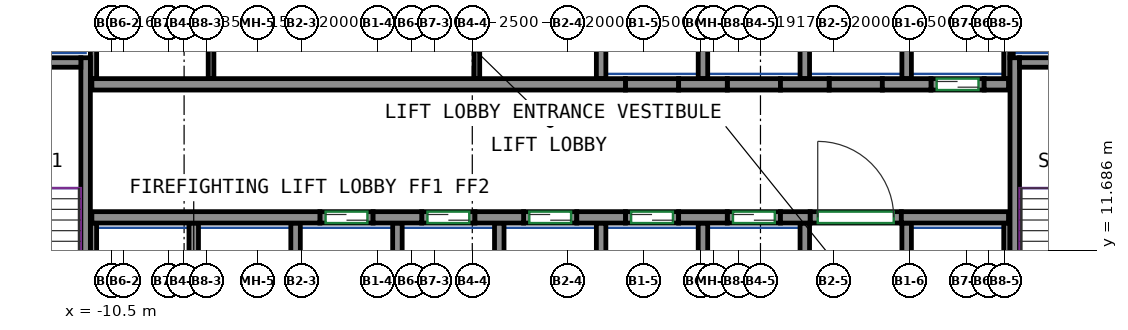
"""IFC4 building model, lengths in metres.
Left out: names, types, materials, properties, quantities, classifications, styles, units other than length and angle.
Written with IfcOpenShell. Run it as: python <this file> out.ifc"""

import sys

from ifc_helpers import new_model, si_unit, direction, frame, frame_2d, origin, place, context, subcontext, project, spatial, rectangle, extrude, source, transform, mapped, element, fill, save


model = new_model("IFC4")
c1 = context("Model", 3, precision=1e-05, world=origin(), true_north=direction((0.0, 1.0)))
c2 = subcontext(c1, "Body", "Model", "MODEL_VIEW")
j1 = project(units=[si_unit("LENGTHUNIT", "METRE"), si_unit("PLANEANGLEUNIT", "RADIAN")], contexts=[c1])
p1 = place(None, origin())
s1 = spatial("IfcSite", under=j1, at=p1, CompositionType="ELEMENT")
p2 = place(p1, origin())
s2 = spatial("IfcBuilding", under=s1, at=p2, CompositionType="ELEMENT")
p3 = place(p2, frame((0.0, 0.0, 175.3)))
s3 = spatial("IfcBuildingStorey", under=s2, at=p3, CompositionType="ELEMENT", Elevation=175.3)
m1 = source(origin(), c2, "Body", "SweptSolid", [
    extrude(rectangle(XDim=7.75, YDim=0.25, at=frame_2d((3.875, 0.0))), origin(), (0.0, 0.0, 1.0), 3.12),
])
p4 = place(p3, frame((-11.175, 9.0, 0.0), z_axis=(0.0, 0.0, 1.0), x_axis=(0.0, 1.0, 0.0)))
e1 = element("IfcWall", 1, at=p4, inside=s3, PredefinedType="SHEAR", context=c2, shape_type="MappedRepresentation", body=[
    mapped(m1, transform((0.0, 0.0, 0.0))),
])
m2 = source(origin(), c2, "Body", "SweptSolid", [
    extrude(rectangle(XDim=3.7, YDim=0.25, at=frame_2d((1.85, 0.0))), origin(), (0.0, 0.0, 1.0), 3.12),
])
p5 = place(p3, frame((-15.0, 16.625, 0.0), z_axis=(0.0, 0.0, 1.0), x_axis=(1.0, 0.0, 0.0)))
e2 = element("IfcWall", 2, at=p5, inside=s3, PredefinedType="SHEAR", context=c2, shape_type="MappedRepresentation", body=[
    mapped(m2, transform((0.0, 0.0, 0.0))),
])
p6 = place(p3, frame((13.275, 9.0, 0.0), z_axis=(0.0, 0.0, 1.0), x_axis=(0.0, 1.0, 0.0)))
e3 = element("IfcWall", 3, at=p6, inside=s3, PredefinedType="SHEAR", context=c2, shape_type="MappedRepresentation", body=[
    mapped(m1, transform((0.0, 0.0, 0.0))),
])
m3 = source(origin(), c2, "Body", "SweptSolid", [
    extrude(rectangle(XDim=3.7, YDim=0.25, at=frame_2d((1.85, 0.0))), origin(), (0.0, 0.0, 1.0), 3.12),
])
p7 = place(p3, frame((13.4, 16.625, 0.0), z_axis=(0.0, 0.0, 1.0), x_axis=(1.0, 0.0, 0.0)))
e4 = element("IfcWall", 4, at=p7, inside=s3, PredefinedType="SHEAR", context=c2, shape_type="MappedRepresentation", body=[
    mapped(m3, transform((0.0, 0.0, 0.0))),
])
m4 = source(origin(), c2, "Body", "SweptSolid", [
    extrude(rectangle(XDim=6.0, YDim=0.3, at=frame_2d((3.0, 0.0))), origin(), (0.0, 0.0, 1.0), 3.12),
])
p8 = place(p3, frame((-11.01, 12.55, 0.0), z_axis=(0.0, 0.0, 1.0), x_axis=(1.0, 0.0, 0.0)))
e5 = element("IfcWall", 5, at=p8, inside=s3, PredefinedType="SHEAR", context=c2, shape_type="MappedRepresentation", body=[
    mapped(m4, transform((0.0, 0.0, 0.0))),
])
m5 = source(origin(), c2, "Body", "SweptSolid", [
    extrude(rectangle(XDim=1.28, YDim=0.3, at=frame_2d((0.64, 0.0))), origin(), (0.0, 0.0, 1.0), 3.12),
])
for number, where, z_axis, x_axis in (
    (6, (-3.61, 12.55, 0.0), (0.0, 0.0, 1.0), (1.0, 0.0, 0.0)),
    (7, (-0.93, 12.55, 0.0), (0.0, 0.0, 1.0), (1.0, 0.0, 0.0)),
    (8, (1.75, 12.55, 0.0), (0.0, 0.0, 1.0), (1.0, 0.0, 0.0)),
    (9, (4.43, 12.55, 0.0), (0.0, 0.0, 1.0), (1.0, 0.0, 0.0)),
):
    element("IfcWall", number, at=place(p3, frame(where, z_axis=z_axis, x_axis=x_axis)), inside=s3, PredefinedType="SHEAR", context=c2, shape_type="MappedRepresentation", body=[
        mapped(m5, transform((0.0, 0.0, 0.0))),
    ])
m6 = source(origin(), c2, "Body", "SweptSolid", [
    extrude(rectangle(XDim=0.78, YDim=0.3, at=frame_2d((0.39, 0.0))), origin(), (0.0, 0.0, 1.0), 3.12),
])
p9 = place(p3, frame((7.11, 12.55, 0.0), z_axis=(0.0, 0.0, 1.0), x_axis=(1.0, 0.0, 0.0)))
e10 = element("IfcWall", 10, at=p9, inside=s3, PredefinedType="SHEAR", context=c2, shape_type="MappedRepresentation", body=[
    mapped(m6, transform((0.0, 0.0, 0.0))),
])
m7 = source(origin(), c2, "Body", "SweptSolid", [
    extrude(rectangle(XDim=2.82, YDim=0.3, at=frame_2d((1.41, 0.0))), origin(), (0.0, 0.0, 1.0), 3.12),
])
p10 = place(p3, frame((10.29, 12.55, 0.0), z_axis=(0.0, 0.0, 1.0), x_axis=(1.0, 0.0, 0.0)))
e11 = element("IfcWall", 11, at=p10, inside=s3, PredefinedType="SHEAR", context=c2, shape_type="MappedRepresentation", body=[
    mapped(m7, transform((0.0, 0.0, 0.0))),
])
m8 = source(origin(), c2, "Body", "SweptSolid", [
    extrude(rectangle(XDim=14.04, YDim=0.3, at=frame_2d((7.02, 0.0))), origin(), (0.0, 0.0, 1.0), 3.12),
])
p11 = place(p3, frame((-11.01, 16.05, 0.0), z_axis=(0.0, 0.0, 1.0), x_axis=(1.0, 0.0, 0.0)))
e12 = element("IfcWall", 12, at=p11, inside=s3, PredefinedType="SHEAR", context=c2, shape_type="MappedRepresentation", body=[
    mapped(m8, transform((0.0, 0.0, 0.0))),
])
p12 = place(p3, frame((4.43, 16.05, 0.0), z_axis=(0.0, 0.0, 1.0), x_axis=(1.0, 0.0, 0.0)))
e13 = element("IfcWall", 13, at=p12, inside=s3, PredefinedType="SHEAR", context=c2, shape_type="MappedRepresentation", body=[
    mapped(m5, transform((0.0, 0.0, 0.0))),
])
m9 = source(origin(), c2, "Body", "SweptSolid", [
    extrude(rectangle(XDim=1.28, YDim=0.3, at=frame_2d((0.64, 0.0))), origin(), (0.0, 0.0, 1.0), 3.12),
])
p13 = place(p3, frame((7.11, 16.05, 0.0), z_axis=(0.0, 0.0, 1.0), x_axis=(1.0, 0.0, 0.0)))
e14 = element("IfcWall", 14, at=p13, inside=s3, PredefinedType="SHEAR", context=c2, shape_type="MappedRepresentation", body=[
    mapped(m9, transform((0.0, 0.0, 0.0))),
])
p14 = place(p3, frame((9.79, 16.05, 0.0), z_axis=(0.0, 0.0, 1.0), x_axis=(1.0, 0.0, 0.0)))
e15 = element("IfcWall", 15, at=p14, inside=s3, PredefinedType="SHEAR", context=c2, shape_type="MappedRepresentation", body=[
    mapped(m5, transform((0.0, 0.0, 0.0))),
])
m10 = source(origin(), c2, "Body", "SweptSolid", [
    extrude(rectangle(XDim=0.64, YDim=0.3, at=frame_2d((0.32, 0.0))), origin(), (0.0, 0.0, 1.0), 3.12),
])
p15 = place(p3, frame((12.47, 16.05, 0.0), z_axis=(0.0, 0.0, 1.0), x_axis=(1.0, 0.0, 0.0)))
e16 = element("IfcWall", 16, at=p15, inside=s3, PredefinedType="SHEAR", context=c2, shape_type="MappedRepresentation", body=[
    mapped(m10, transform((0.0, 0.0, 0.0))),
])
m11 = source(origin(), c2, "Body", "SweptSolid", [
    extrude(rectangle(XDim=1.4, YDim=0.3, at=frame_2d((0.7, 0.0))), origin(), (0.0, 0.0, 1.0), 3.12),
])
p16 = place(p3, frame((-5.01, 12.55, 0.0), z_axis=(0.0, 0.0, 1.0), x_axis=(1.0, 0.0, 0.0)))
e17 = element("IfcWall", 17, at=p16, inside=s3, PredefinedType="PARTITIONING", context=c2, shape_type="MappedRepresentation", body=[
    mapped(m11, transform((0.0, 0.0, 0.0))),
])
p17 = place(p16, frame((0.15, 0.0, 0.0)))
e18 = element("IfcOpeningElement", 18, at=p17, cuts=e17, PredefinedType="OPENING", context=c2, shape_type="SweptSolid", body=[
    extrude(rectangle(XDim=1.1, YDim=2.1, at=frame_2d((0.55, 1.05))), frame((0.0, 0.16, 0.0), z_axis=(0.0, -1.0, 0.0), x_axis=(1.0, 0.0, 0.0)), (0.0, 0.0, 1.0), 0.32),
])
m12 = source(origin(), c2, "Body", "SweptSolid", [
    extrude(rectangle(XDim=1.4, YDim=0.3, at=frame_2d((0.7, 0.0))), origin(), (0.0, 0.0, 1.0), 3.12),
])
p18 = place(p3, frame((-2.33, 12.55, 0.0), z_axis=(0.0, 0.0, 1.0), x_axis=(1.0, 0.0, 0.0)))
e19 = element("IfcWall", 19, at=p18, inside=s3, PredefinedType="PARTITIONING", context=c2, shape_type="MappedRepresentation", body=[
    mapped(m12, transform((0.0, 0.0, 0.0))),
])
p19 = place(p18, frame((0.15, 0.0, 0.0)))
e20 = element("IfcOpeningElement", 20, at=p19, cuts=e19, PredefinedType="OPENING", context=c2, shape_type="SweptSolid", body=[
    extrude(rectangle(XDim=1.1, YDim=2.1, at=frame_2d((0.55, 1.05))), frame((0.0, 0.16, 0.0), z_axis=(0.0, -1.0, 0.0), x_axis=(1.0, 0.0, 0.0)), (0.0, 0.0, 1.0), 0.32),
])
p20 = place(p3, frame((0.35, 12.55, 0.0), z_axis=(0.0, 0.0, 1.0), x_axis=(1.0, 0.0, 0.0)))
e21 = element("IfcWall", 21, at=p20, inside=s3, PredefinedType="PARTITIONING", context=c2, shape_type="MappedRepresentation", body=[
    mapped(m11, transform((0.0, 0.0, 0.0))),
])
p21 = place(p20, frame((0.15, 0.0, 0.0)))
e22 = element("IfcOpeningElement", 22, at=p21, cuts=e21, PredefinedType="OPENING", context=c2, shape_type="SweptSolid", body=[
    extrude(rectangle(XDim=1.1, YDim=2.1, at=frame_2d((0.55, 1.05))), frame((0.0, 0.16, 0.0), z_axis=(0.0, -1.0, 0.0), x_axis=(1.0, 0.0, 0.0)), (0.0, 0.0, 1.0), 0.32),
])
p22 = place(p3, frame((3.03, 12.55, 0.0), z_axis=(0.0, 0.0, 1.0), x_axis=(1.0, 0.0, 0.0)))
e23 = element("IfcWall", 23, at=p22, inside=s3, PredefinedType="PARTITIONING", context=c2, shape_type="MappedRepresentation", body=[
    mapped(m11, transform((0.0, 0.0, 0.0))),
])
p23 = place(p22, frame((0.15, 0.0, 0.0)))
e24 = element("IfcOpeningElement", 24, at=p23, cuts=e23, PredefinedType="OPENING", context=c2, shape_type="SweptSolid", body=[
    extrude(rectangle(XDim=1.1, YDim=2.1, at=frame_2d((0.55, 1.05))), frame((0.0, 0.16, 0.0), z_axis=(0.0, -1.0, 0.0), x_axis=(1.0, 0.0, 0.0)), (0.0, 0.0, 1.0), 0.32),
])
p24 = place(p3, frame((5.71, 12.55, 0.0), z_axis=(0.0, 0.0, 1.0), x_axis=(1.0, 0.0, 0.0)))
e25 = element("IfcWall", 25, at=p24, inside=s3, PredefinedType="PARTITIONING", context=c2, shape_type="MappedRepresentation", body=[
    mapped(m12, transform((0.0, 0.0, 0.0))),
])
p25 = place(p24, frame((0.15, 0.0, 0.0)))
e26 = element("IfcOpeningElement", 26, at=p25, cuts=e25, PredefinedType="OPENING", context=c2, shape_type="SweptSolid", body=[
    extrude(rectangle(XDim=1.1, YDim=2.1, at=frame_2d((0.55, 1.05))), frame((0.0, 0.16, 0.0), z_axis=(0.0, -1.0, 0.0), x_axis=(1.0, 0.0, 0.0)), (0.0, 0.0, 1.0), 0.32),
])
p26 = place(p3, frame((11.07, 16.05, 0.0), z_axis=(0.0, 0.0, 1.0), x_axis=(1.0, 0.0, 0.0)))
e27 = element("IfcWall", 27, at=p26, inside=s3, PredefinedType="PARTITIONING", context=c2, shape_type="MappedRepresentation", body=[
    mapped(m11, transform((0.0, 0.0, 0.0))),
])
p27 = place(p26, frame((0.15, 0.0, 0.0)))
e28 = element("IfcOpeningElement", 28, at=p27, cuts=e27, PredefinedType="OPENING", context=c2, shape_type="SweptSolid", body=[
    extrude(rectangle(XDim=1.1, YDim=2.1, at=frame_2d((0.55, 1.05))), frame((0.0, 0.16, 0.0), z_axis=(0.0, -1.0, 0.0), x_axis=(1.0, 0.0, 0.0)), (0.0, 0.0, 1.0), 0.32),
])
m13 = source(origin(), c2, "Body", "SweptSolid", [
    extrude(rectangle(XDim=2.4, YDim=0.3, at=frame_2d((1.2, 0.0))), origin(), (0.0, 0.0, 1.0), 3.12),
])
p28 = place(p3, frame((7.89, 12.55, 0.0), z_axis=(0.0, 0.0, 1.0), x_axis=(1.0, 0.0, 0.0)))
e29 = element("IfcWall", 29, at=p28, inside=s3, PredefinedType="PARTITIONING", context=c2, shape_type="MappedRepresentation", body=[
    mapped(m13, transform((0.0, 0.0, 0.0))),
])
p29 = place(p28, frame((0.2, 0.0, 0.0)))
e30 = element("IfcOpeningElement", 30, at=p29, cuts=e29, PredefinedType="OPENING", context=c2, shape_type="SweptSolid", body=[
    extrude(rectangle(XDim=2.0, YDim=2.1, at=frame_2d((1.0, 1.05))), frame((0.0, 0.16, 0.0), z_axis=(0.0, -1.0, 0.0), x_axis=(1.0, 0.0, 0.0)), (0.0, 0.0, 1.0), 0.32),
])
p30 = place(p3, frame((3.03, 16.05, 0.0), z_axis=(0.0, 0.0, 1.0), x_axis=(1.0, 0.0, 0.0)))
e31 = element("IfcWall", 31, at=p30, inside=s3, PredefinedType="PARTITIONING", context=c2, shape_type="MappedRepresentation", body=[
    mapped(m11, transform((0.0, 0.0, 0.0))),
])
for number, where, z_axis, x_axis in (
    (32, (5.71, 16.05, 0.0), (0.0, 0.0, 1.0), (1.0, 0.0, 0.0)),
    (33, (8.39, 16.05, 0.0), (0.0, 0.0, 1.0), (1.0, 0.0, 0.0)),
):
    element("IfcWall", number, at=place(p3, frame(where, z_axis=z_axis, x_axis=x_axis)), inside=s3, PredefinedType="PARTITIONING", context=c2, shape_type="MappedRepresentation", body=[
        mapped(m12, transform((0.0, 0.0, 0.0))),
    ])
m14 = source(origin(), c2, "Body", "SweptSolid", [
    extrude(rectangle(XDim=3.275, YDim=0.165, at=frame_2d((1.638, 0.0))), origin(), (0.0, 0.0, 1.0), 3.12),
])
p31 = place(p3, frame((13.067, 16.2, 0.0), z_axis=(0.0, 0.0, 1.0), x_axis=(0.0, 1.0, 0.0)))
e34 = element("IfcWall", 34, at=p31, inside=s3, PredefinedType="PARTITIONING", context=c2, shape_type="MappedRepresentation", body=[
    mapped(m14, transform((0.0, 0.0, 0.0))),
])
m15 = source(origin(), c2, "Body", "SweptSolid", [
    extrude(rectangle(XDim=4.8, YDim=0.165, at=frame_2d((2.4, 0.0))), origin(), (0.0, 0.0, 1.0), 3.12),
])
p32 = place(p3, frame((-10.968, 16.2, 0.0), z_axis=(0.0, 0.0, 1.0), x_axis=(0.0, 1.0, 0.0)))
e35 = element("IfcWall", 35, at=p32, inside=s3, PredefinedType="PARTITIONING", context=c2, shape_type="MappedRepresentation", body=[
    mapped(m15, transform((0.0, 0.0, 0.0))),
])
m16 = source(origin(), c2, "Body", "SweptSolid", [
    extrude(rectangle(XDim=3.275, YDim=0.25, at=frame_2d((1.638, 0.0))), origin(), (0.0, 0.0, 1.0), 3.12),
])
p33 = place(p3, frame((10.43, 16.2, 0.0), z_axis=(0.0, 0.0, 1.0), x_axis=(0.0, 1.0, 0.0)))
e36 = element("IfcWall", 36, at=p33, inside=s3, PredefinedType="PARTITIONING", context=c2, shape_type="MappedRepresentation", body=[
    mapped(m16, transform((0.0, 0.0, 0.0))),
])
m17 = source(origin(), c2, "Body", "SweptSolid", [
    extrude(rectangle(XDim=2.725, YDim=0.085, at=frame_2d((1.363, 0.0))), origin(), (0.0, 0.0, 1.0), 3.12),
])
p34 = place(p3, frame((13.192, 16.75, 0.0), z_axis=(0.0, 0.0, 1.0), x_axis=(0.0, 1.0, 0.0)))
e37 = element("IfcWall", 37, at=p34, inside=s3, PredefinedType="PARTITIONING", context=c2, shape_type="MappedRepresentation", body=[
    mapped(m17, transform((0.0, 0.0, 0.0))),
])
for number, where, z_axis, x_axis in (
    (38, (2.39, 16.2, 0.0), (0.0, 0.0, 1.0), (0.0, 1.0, 0.0)),
    (39, (5.07, 16.2, 0.0), (0.0, 0.0, 1.0), (0.0, 1.0, 0.0)),
    (40, (7.75, 16.2, 0.0), (0.0, 0.0, 1.0), (0.0, 1.0, 0.0)),
):
    element("IfcWall", number, at=place(p3, frame(where, z_axis=z_axis, x_axis=x_axis)), inside=s3, PredefinedType="PARTITIONING", context=c2, shape_type="MappedRepresentation", body=[
        mapped(m16, transform((0.0, 0.0, 0.0))),
    ])
m18 = source(origin(), c2, "Body", "SweptSolid", [
    extrude(rectangle(XDim=3.4, YDim=0.25, at=frame_2d((1.7, 0.0))), origin(), (0.0, 0.0, 1.0), 3.12),
])
p35 = place(p3, frame((10.43, 9.0, 0.0), z_axis=(0.0, 0.0, 1.0), x_axis=(0.0, 1.0, 0.0)))
e41 = element("IfcWall", 41, at=p35, inside=s3, PredefinedType="PARTITIONING", context=c2, shape_type="MappedRepresentation", body=[
    mapped(m18, transform((0.0, 0.0, 0.0))),
])
m19 = source(origin(), c2, "Body", "SweptSolid", [
    extrude(rectangle(XDim=3.4, YDim=0.165, at=frame_2d((1.7, 0.0))), origin(), (0.0, 0.0, 1.0), 3.12),
])
p36 = place(p3, frame((13.067, 9.0, 0.0), z_axis=(0.0, 0.0, 1.0), x_axis=(0.0, 1.0, 0.0)))
e42 = element("IfcWall", 42, at=p36, inside=s3, PredefinedType="PARTITIONING", context=c2, shape_type="MappedRepresentation", body=[
    mapped(m19, transform((0.0, 0.0, 0.0))),
])
for number, where, z_axis, x_axis in (
    (43, (2.39, 9.0, 0.0), (0.0, 0.0, 1.0), (0.0, 1.0, 0.0)),
    (44, (5.07, 9.0, 0.0), (0.0, 0.0, 1.0), (0.0, 1.0, 0.0)),
    (45, (7.75, 9.0, 0.0), (0.0, 0.0, 1.0), (0.0, 1.0, 0.0)),
    (46, (-0.29, 9.0, 0.0), (0.0, 0.0, 1.0), (0.0, 1.0, 0.0)),
):
    element("IfcWall", number, at=place(p3, frame(where, z_axis=z_axis, x_axis=x_axis)), inside=s3, PredefinedType="PARTITIONING", context=c2, shape_type="MappedRepresentation", body=[
        mapped(m18, transform((0.0, 0.0, 0.0))),
    ])
p37 = place(p3, frame((-10.968, 9.0, 0.0), z_axis=(0.0, 0.0, 1.0), x_axis=(0.0, 1.0, 0.0)))
e47 = element("IfcWall", 47, at=p37, inside=s3, PredefinedType="PARTITIONING", context=c2, shape_type="MappedRepresentation", body=[
    mapped(m19, transform((0.0, 0.0, 0.0))),
])
for number, where, z_axis, x_axis in (
    (48, (-2.97, 9.0, 0.0), (0.0, 0.0, 1.0), (0.0, 1.0, 0.0)),
    (49, (-5.65, 9.0, 0.0), (0.0, 0.0, 1.0), (0.0, 1.0, 0.0)),
    (50, (-8.33, 9.0, 0.0), (0.0, 0.0, 1.0), (0.0, 1.0, 0.0)),
):
    element("IfcWall", number, at=place(p3, frame(where, z_axis=z_axis, x_axis=x_axis)), inside=s3, PredefinedType="PARTITIONING", context=c2, shape_type="MappedRepresentation", body=[
        mapped(m18, transform((0.0, 0.0, 0.0))),
    ])
m20 = source(origin(), c2, "Body", "SweptSolid", [
    extrude(rectangle(XDim=4.8, YDim=0.15, at=frame_2d((2.4, 0.0))), origin(), (0.0, 0.0, 1.0), 3.12),
])
for number, where, z_axis, x_axis in (
    (51, (-7.875, 16.2, 0.0), (0.0, 0.0, 1.0), (0.0, 1.0, 0.0)),
    (52, (-0.88, 16.2, 0.0), (0.0, 0.0, 1.0), (0.0, 1.0, 0.0)),
):
    element("IfcWall", number, at=place(p3, frame(where, z_axis=z_axis, x_axis=x_axis)), inside=s3, PredefinedType="PARTITIONING", context=c2, shape_type="MappedRepresentation", body=[
        mapped(m20, transform((0.0, 0.0, 0.0))),
    ])
p38 = place(p29, origin())
e53 = element("IfcDoor", 53, at=p38, inside=s3, OperationType="DOUBLE_DOOR_SINGLE_SWING", PredefinedType="DOOR", context=c2, shape_type="SweptSolid", body=[
    extrude(rectangle(XDim=2.0, YDim=2.1, at=frame_2d((1.0, 1.05))), frame((0.0, 0.025, 0.0), z_axis=(0.0, -1.0, 0.0), x_axis=(1.0, 0.0, 0.0)), (0.0, 0.0, 1.0), 0.05),
])
fill(e30, e53)
p39 = place(p17, origin())
e54 = element("IfcDoor", 54, at=p39, inside=s3, OperationType="DOUBLE_DOOR_SLIDING", PredefinedType="DOOR", context=c2, shape_type="SweptSolid", body=[
    extrude(rectangle(XDim=1.1, YDim=2.1, at=frame_2d((0.55, 1.05))), frame((0.0, 0.025, 0.0), z_axis=(0.0, -1.0, 0.0), x_axis=(1.0, 0.0, 0.0)), (0.0, 0.0, 1.0), 0.05),
])
fill(e18, e54)
p40 = place(p19, origin())
e55 = element("IfcDoor", 55, at=p40, inside=s3, OperationType="DOUBLE_DOOR_SLIDING", PredefinedType="DOOR", context=c2, shape_type="SweptSolid", body=[
    extrude(rectangle(XDim=1.1, YDim=2.1, at=frame_2d((0.55, 1.05))), frame((0.0, 0.025, 0.0), z_axis=(0.0, -1.0, 0.0), x_axis=(1.0, 0.0, 0.0)), (0.0, 0.0, 1.0), 0.05),
])
fill(e20, e55)
p41 = place(p21, origin())
e56 = element("IfcDoor", 56, at=p41, inside=s3, OperationType="DOUBLE_DOOR_SLIDING", PredefinedType="DOOR", context=c2, shape_type="SweptSolid", body=[
    extrude(rectangle(XDim=1.1, YDim=2.1, at=frame_2d((0.55, 1.05))), frame((0.0, 0.025, 0.0), z_axis=(0.0, -1.0, 0.0), x_axis=(1.0, 0.0, 0.0)), (0.0, 0.0, 1.0), 0.05),
])
fill(e22, e56)
p42 = place(p23, origin())
e57 = element("IfcDoor", 57, at=p42, inside=s3, OperationType="DOUBLE_DOOR_SLIDING", PredefinedType="DOOR", context=c2, shape_type="SweptSolid", body=[
    extrude(rectangle(XDim=1.1, YDim=2.1, at=frame_2d((0.55, 1.05))), frame((0.0, 0.025, 0.0), z_axis=(0.0, -1.0, 0.0), x_axis=(1.0, 0.0, 0.0)), (0.0, 0.0, 1.0), 0.05),
])
fill(e24, e57)
p43 = place(p25, origin())
e58 = element("IfcDoor", 58, at=p43, inside=s3, OperationType="DOUBLE_DOOR_SLIDING", PredefinedType="DOOR", context=c2, shape_type="SweptSolid", body=[
    extrude(rectangle(XDim=1.1, YDim=2.1, at=frame_2d((0.55, 1.05))), frame((0.0, 0.025, 0.0), z_axis=(0.0, -1.0, 0.0), x_axis=(1.0, 0.0, 0.0)), (0.0, 0.0, 1.0), 0.05),
])
fill(e26, e58)
p44 = place(p27, origin())
e59 = element("IfcDoor", 59, at=p44, inside=s3, OperationType="DOUBLE_DOOR_SLIDING", PredefinedType="DOOR", context=c2, shape_type="SweptSolid", body=[
    extrude(rectangle(XDim=1.1, YDim=2.1, at=frame_2d((0.55, 1.05))), frame((0.0, 0.025, 0.0), z_axis=(0.0, -1.0, 0.0), x_axis=(1.0, 0.0, 0.0)), (0.0, 0.0, 1.0), 0.05),
])
fill(e28, e59)
save(model, sys.argv[1])
